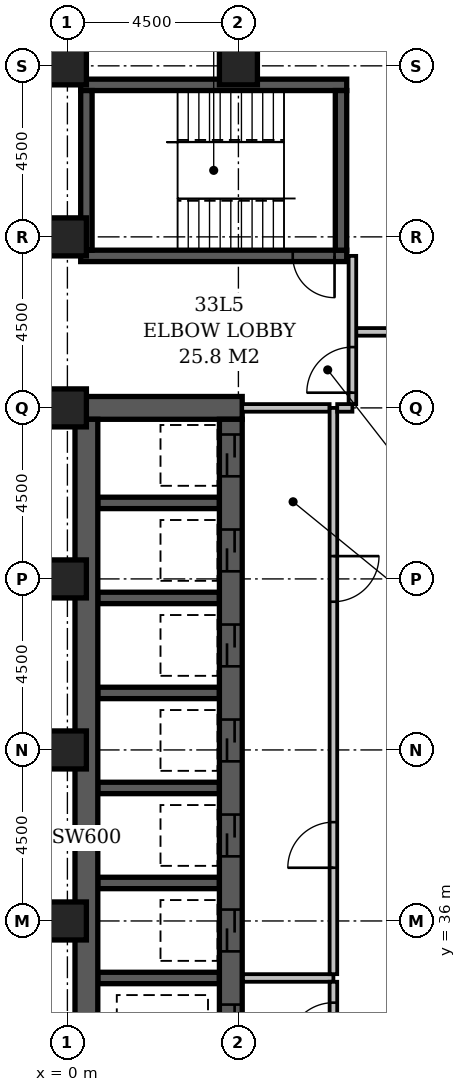
"""IFC4 building model, lengths in metres.
Left out: names, types, materials, properties, quantities, classifications, styles, units other than length and angle.
Written with IfcOpenShell. Run it as: python <this file> out.ifc"""

import sys

from ifc_helpers import new_model, si_unit, direction, frame, frame_2d, origin, origin_2d, place, context, subcontext, project, spatial, rectangle, extrude, element, fill, save


model = new_model("IFC4")
c1 = context("Model", 3, precision=1e-05, world=origin(), true_north=direction((0.0, 1.0)))
c2 = subcontext(c1, "Body", "Model", "MODEL_VIEW")
j1 = project(units=[si_unit("LENGTHUNIT", "METRE"), si_unit("PLANEANGLEUNIT", "RADIAN")], contexts=[c1])
p1 = place(None, origin())
s1 = spatial("IfcSite", under=j1, at=p1, CompositionType="ELEMENT")
p2 = place(p1, origin())
s2 = spatial("IfcBuilding", under=s1, at=p2, CompositionType="ELEMENT")
p3 = place(p2, frame((0.0, 0.0, 134.0)))
s3 = spatial("IfcBuildingStorey", under=s2, at=p3, CompositionType="ELEMENT", Elevation=134.0)
p4 = place(p3, frame((0.2, 49.5, -0.3), z_axis=(0.0, 0.0, 1.0), x_axis=(1.0, 0.0, 0.0)))
e1 = element("IfcWall", 1, at=p4, inside=s3, PredefinedType="SHEAR", context=c2, shape_type="SweptSolid", body=[
    extrude(rectangle(XDim=4.4, YDim=0.6, at=frame_2d((2.2, 0.0))), origin(), (0.0, 0.0, 1.0), 3.6),
])
p5 = place(p3, frame((0.35, 53.5, -0.3), z_axis=(0.0, 0.0, 1.0), x_axis=(1.0, 0.0, 0.0)))
e2 = element("IfcWall", 2, at=p5, inside=s3, PredefinedType="SHEAR", context=c2, shape_type="SweptSolid", body=[
    extrude(rectangle(XDim=7.0, YDim=0.3, at=frame_2d((3.5, 0.0))), origin(), (0.0, 0.0, 1.0), 3.6),
])
p6 = place(p5, frame((5.58, 0.0, 0.3)))
e3 = element("IfcOpeningElement", 3, at=p6, cuts=e2, PredefinedType="OPENING", context=c2, shape_type="SweptSolid", body=[
    extrude(rectangle(XDim=1.1, YDim=2.1, at=frame_2d((0.55, 1.05))), frame((0.0, 0.162, 0.0), z_axis=(0.0, -1.0, 0.0), x_axis=(1.0, 0.0, 0.0)), (0.0, 0.0, 1.0), 0.324),
])
p7 = place(p3, frame((0.35, 58.0, -0.3), z_axis=(0.0, 0.0, 1.0), x_axis=(1.0, 0.0, 0.0)))
e4 = element("IfcWall", 4, at=p7, inside=s3, PredefinedType="SHEAR", context=c2, shape_type="SweptSolid", body=[
    extrude(rectangle(XDim=7.0, YDim=0.3, at=frame_2d((3.5, 0.0))), origin(), (0.0, 0.0, 1.0), 3.6),
])
p8 = place(p3, frame((0.5, 27.15, -0.3), z_axis=(0.0, 0.0, 1.0), x_axis=(0.0, 1.0, 0.0)))
e5 = element("IfcWall", 5, at=p8, inside=s3, PredefinedType="SHEAR", context=c2, shape_type="SweptSolid", body=[
    extrude(rectangle(XDim=22.05, YDim=0.6, at=frame_2d((11.025, 0.0))), origin(), (0.0, 0.0, 1.0), 3.6),
])
p9 = place(p3, frame((0.5, 53.65, -0.3), z_axis=(0.0, 0.0, 1.0), x_axis=(0.0, 1.0, 0.0)))
e6 = element("IfcWall", 6, at=p9, inside=s3, PredefinedType="SHEAR", context=c2, shape_type="SweptSolid", body=[
    extrude(rectangle(XDim=4.2, YDim=0.3, at=frame_2d((2.1, 0.0))), origin(), (0.0, 0.0, 1.0), 3.6),
])
for number, where, z_axis, x_axis in (
    (7, (0.8, 34.5, -0.3), (0.0, 0.0, 1.0), (1.0, 0.0, 0.0)),
    (8, (0.8, 37.0, -0.3), (0.0, 0.0, 1.0), (1.0, 0.0, 0.0)),
    (9, (0.8, 39.5, -0.3), (0.0, 0.0, 1.0), (1.0, 0.0, 0.0)),
    (10, (0.8, 42.0, -0.3), (0.0, 0.0, 1.0), (1.0, 0.0, 0.0)),
    (11, (0.8, 44.5, -0.3), (0.0, 0.0, 1.0), (1.0, 0.0, 0.0)),
    (12, (0.8, 47.0, -0.3), (0.0, 0.0, 1.0), (1.0, 0.0, 0.0)),
):
    element("IfcWall", number, at=place(p3, frame(where, z_axis=z_axis, x_axis=x_axis)), inside=s3, PredefinedType="SHEAR", context=c2, shape_type="SweptSolid", body=[
        extrude(rectangle(XDim=3.2, YDim=0.3, at=frame_2d((1.6, 0.0))), origin(), (0.0, 0.0, 1.0), 3.6),
    ])
p10 = place(p3, frame((4.3, 27.15, -0.3), z_axis=(0.0, 0.0, 1.0), x_axis=(0.0, 1.0, 0.0)))
e13 = element("IfcWall", 13, at=p10, inside=s3, PredefinedType="SHEAR", context=c2, shape_type="SweptSolid", body=[
    extrude(rectangle(XDim=22.05, YDim=0.6, at=frame_2d((11.025, 0.0))), origin(), (0.0, 0.0, 1.0), 3.6),
])
p11 = place(p10, frame((3.05, 0.0, 0.3)))
e14 = element("IfcOpeningElement", 14, at=p11, cuts=e13, PredefinedType="OPENING", context=c2, shape_type="SweptSolid", body=[
    extrude(rectangle(XDim=1.1, YDim=2.1, at=frame_2d((0.55, 1.05))), frame((0.0, 0.312, 0.0), z_axis=(0.0, -1.0, 0.0), x_axis=(1.0, 0.0, 0.0)), (0.0, 0.0, 1.0), 0.624),
])
p12 = place(p10, frame((0.55, 0.0, 0.3)))
e15 = element("IfcOpeningElement", 15, at=p12, cuts=e13, PredefinedType="OPENING", context=c2, shape_type="SweptSolid", body=[
    extrude(rectangle(XDim=1.1, YDim=2.1, at=frame_2d((0.55, 1.05))), frame((0.0, 0.312, 0.0), z_axis=(0.0, -1.0, 0.0), x_axis=(1.0, 0.0, 0.0)), (0.0, 0.0, 1.0), 0.624),
])
p13 = place(p10, frame((20.55, 0.0, 0.3)))
e16 = element("IfcOpeningElement", 16, at=p13, cuts=e13, PredefinedType="OPENING", context=c2, shape_type="SweptSolid", body=[
    extrude(rectangle(XDim=1.1, YDim=2.1, at=frame_2d((0.55, 1.05))), frame((0.0, 0.312, 0.0), z_axis=(0.0, -1.0, 0.0), x_axis=(1.0, 0.0, 0.0)), (0.0, 0.0, 1.0), 0.624),
])
p14 = place(p10, frame((18.05, 0.0, 0.3)))
e17 = element("IfcOpeningElement", 17, at=p14, cuts=e13, PredefinedType="OPENING", context=c2, shape_type="SweptSolid", body=[
    extrude(rectangle(XDim=1.1, YDim=2.1, at=frame_2d((0.55, 1.05))), frame((0.0, 0.312, 0.0), z_axis=(0.0, -1.0, 0.0), x_axis=(1.0, 0.0, 0.0)), (0.0, 0.0, 1.0), 0.624),
])
p15 = place(p10, frame((15.55, 0.0, 0.3)))
e18 = element("IfcOpeningElement", 18, at=p15, cuts=e13, PredefinedType="OPENING", context=c2, shape_type="SweptSolid", body=[
    extrude(rectangle(XDim=1.1, YDim=2.1, at=frame_2d((0.55, 1.05))), frame((0.0, 0.312, 0.0), z_axis=(0.0, -1.0, 0.0), x_axis=(1.0, 0.0, 0.0)), (0.0, 0.0, 1.0), 0.624),
])
p16 = place(p10, frame((13.05, 0.0, 0.3)))
e19 = element("IfcOpeningElement", 19, at=p16, cuts=e13, PredefinedType="OPENING", context=c2, shape_type="SweptSolid", body=[
    extrude(rectangle(XDim=1.1, YDim=2.1, at=frame_2d((0.55, 1.05))), frame((0.0, 0.312, 0.0), z_axis=(0.0, -1.0, 0.0), x_axis=(1.0, 0.0, 0.0)), (0.0, 0.0, 1.0), 0.624),
])
p17 = place(p10, frame((10.55, 0.0, 0.3)))
e20 = element("IfcOpeningElement", 20, at=p17, cuts=e13, PredefinedType="OPENING", context=c2, shape_type="SweptSolid", body=[
    extrude(rectangle(XDim=1.1, YDim=2.1, at=frame_2d((0.55, 1.05))), frame((0.0, 0.312, 0.0), z_axis=(0.0, -1.0, 0.0), x_axis=(1.0, 0.0, 0.0)), (0.0, 0.0, 1.0), 0.624),
])
p18 = place(p10, frame((8.05, 0.0, 0.3)))
e21 = element("IfcOpeningElement", 21, at=p18, cuts=e13, PredefinedType="OPENING", context=c2, shape_type="SweptSolid", body=[
    extrude(rectangle(XDim=1.1, YDim=2.1, at=frame_2d((0.55, 1.05))), frame((0.0, 0.312, 0.0), z_axis=(0.0, -1.0, 0.0), x_axis=(1.0, 0.0, 0.0)), (0.0, 0.0, 1.0), 0.624),
])
p19 = place(p10, frame((5.55, 0.0, 0.3)))
e22 = element("IfcOpeningElement", 22, at=p19, cuts=e13, PredefinedType="OPENING", context=c2, shape_type="SweptSolid", body=[
    extrude(rectangle(XDim=1.1, YDim=2.1, at=frame_2d((0.55, 1.05))), frame((0.0, 0.312, 0.0), z_axis=(0.0, -1.0, 0.0), x_axis=(1.0, 0.0, 0.0)), (0.0, 0.0, 1.0), 0.624),
])
p20 = place(p3, frame((7.2, 53.65, -0.3), z_axis=(0.0, 0.0, 1.0), x_axis=(0.0, 1.0, 0.0)))
e23 = element("IfcWall", 23, at=p20, inside=s3, PredefinedType="SHEAR", context=c2, shape_type="SweptSolid", body=[
    extrude(rectangle(XDim=4.2, YDim=0.3, at=frame_2d((2.1, 0.0))), origin(), (0.0, 0.0, 1.0), 3.6),
])
for number, where, z_axis, x_axis in (
    (24, (0.0, 36.0, -0.3), (0.0, 0.0, 1.0), (1.0, 0.0, 0.0)),
    (25, (0.0, 40.5, -0.3), (0.0, 0.0, 1.0), (1.0, 0.0, 0.0)),
    (26, (0.0, 45.0, -0.3), (0.0, 0.0, 1.0), (1.0, 0.0, 0.0)),
    (27, (0.0, 49.5, -0.3), (0.0, 0.0, 1.0), (1.0, 0.0, 0.0)),
    (28, (0.0, 54.0, -0.3), (0.0, 0.0, 1.0), (1.0, 0.0, 0.0)),
    (29, (0.0, 58.5, -0.3), (0.0, 0.0, 1.0), (1.0, 0.0, 0.0)),
    (30, (4.5, 58.5, -0.3), (0.0, 0.0, 1.0), (1.0, 0.0, 0.0)),
):
    element("IfcColumn", number, at=place(p3, frame(where, z_axis=z_axis, x_axis=x_axis)), inside=s3, PredefinedType="COLUMN", context=c2, shape_type="SweptSolid", body=[
        extrude(rectangle(XDim=1.0, YDim=1.0, at=origin_2d()), origin(), (0.0, 0.0, 1.0), 3.6),
    ])
p21 = place(p3, frame((4.62, 34.5, 0.0), z_axis=(0.0, 0.0, 1.0), x_axis=(1.0, 0.0, 0.0)))
e31 = element("IfcWall", 31, at=p21, inside=s3, PredefinedType="PARTITIONING", context=c2, shape_type="SweptSolid", body=[
    extrude(rectangle(XDim=2.38, YDim=0.2, at=frame_2d((1.19, 0.0))), origin(), (0.0, 0.0, 1.0), 3.3),
])
p22 = place(p3, frame((7.0, 34.6, 0.0), z_axis=(0.0, 0.0, 1.0), x_axis=(0.0, 1.0, 0.0)))
e32 = element("IfcWall", 32, at=p22, inside=s3, PredefinedType="PARTITIONING", context=c2, shape_type="SweptSolid", body=[
    extrude(rectangle(XDim=14.9, YDim=0.2, at=frame_2d((7.45, 0.0))), origin(), (0.0, 0.0, 1.0), 3.3),
])
p23 = place(p22, frame((2.8, 0.0, 0.0)))
e33 = element("IfcOpeningElement", 33, at=p23, cuts=e32, PredefinedType="OPENING", context=c2, shape_type="SweptSolid", body=[
    extrude(rectangle(XDim=1.2, YDim=2.1, at=frame_2d((0.6, 1.05))), frame((0.0, 0.112, 0.0), z_axis=(0.0, -1.0, 0.0), x_axis=(1.0, 0.0, 0.0)), (0.0, 0.0, 1.0), 0.224),
])
p24 = place(p22, frame((9.8, 0.0, 0.0)))
e34 = element("IfcOpeningElement", 34, at=p24, cuts=e32, PredefinedType="OPENING", context=c2, shape_type="SweptSolid", body=[
    extrude(rectangle(XDim=1.2, YDim=2.1, at=frame_2d((0.6, 1.05))), frame((0.0, 0.112, 0.0), z_axis=(0.0, -1.0, 0.0), x_axis=(1.0, 0.0, 0.0)), (0.0, 0.0, 1.0), 0.224),
])
p25 = place(p3, frame((4.6, 49.5, 0.0), z_axis=(0.0, 0.0, 1.0), x_axis=(1.0, 0.0, 0.0)))
e35 = element("IfcWall", 35, at=p25, inside=s3, PredefinedType="PARTITIONING", context=c2, shape_type="SweptSolid", body=[
    extrude(rectangle(XDim=2.3, YDim=0.2, at=frame_2d((1.15, 0.0))), origin(), (0.0, 0.0, 1.0), 3.3),
])
p26 = place(p3, frame((7.0, 32.1, 0.0), z_axis=(0.0, 0.0, 1.0), x_axis=(0.0, 1.0, 0.0)))
e36 = element("IfcWall", 36, at=p26, inside=s3, PredefinedType="PARTITIONING", context=c2, shape_type="SweptSolid", body=[
    extrude(rectangle(XDim=2.3, YDim=0.2, at=frame_2d((1.15, 0.0))), origin(), (0.0, 0.0, 1.0), 3.3),
])
p27 = place(p26, frame((0.55, 0.0, 0.0)))
e37 = element("IfcOpeningElement", 37, at=p27, cuts=e36, PredefinedType="OPENING", context=c2, shape_type="SweptSolid", body=[
    extrude(rectangle(XDim=1.2, YDim=2.1, at=frame_2d((0.6, 1.05))), frame((0.0, 0.112, 0.0), z_axis=(0.0, -1.0, 0.0), x_axis=(1.0, 0.0, 0.0)), (0.0, 0.0, 1.0), 0.224),
])
p28 = place(p3, frame((7.1, 49.5, 0.0), z_axis=(0.0, 0.0, 1.0), x_axis=(1.0, 0.0, 0.0)))
e38 = element("IfcWall", 38, at=p28, inside=s3, PredefinedType="PARTITIONING", context=c2, shape_type="SweptSolid", body=[
    extrude(rectangle(XDim=0.4, YDim=0.2, at=frame_2d((0.2, 0.0))), origin(), (0.0, 0.0, 1.0), 3.3),
])
p29 = place(p3, frame((7.5, 49.6, 0.0), z_axis=(0.0, 0.0, 1.0), x_axis=(0.0, 1.0, 0.0)))
e39 = element("IfcWall", 39, at=p29, inside=s3, PredefinedType="PARTITIONING", context=c2, shape_type="SweptSolid", body=[
    extrude(rectangle(XDim=3.9, YDim=0.2, at=frame_2d((1.95, 0.0))), origin(), (0.0, 0.0, 1.0), 3.3),
])
p30 = place(p29, frame((0.3, 0.0, 0.0)))
e40 = element("IfcOpeningElement", 40, at=p30, cuts=e39, PredefinedType="OPENING", context=c2, shape_type="SweptSolid", body=[
    extrude(rectangle(XDim=1.2, YDim=2.1, at=frame_2d((0.6, 1.05))), frame((0.0, 0.112, 0.0), z_axis=(0.0, -1.0, 0.0), x_axis=(1.0, 0.0, 0.0)), (0.0, 0.0, 1.0), 0.224),
])
p31 = place(p3, frame((7.6, 51.5, 0.0), z_axis=(0.0, 0.0, 1.0), x_axis=(1.0, 0.0, 0.0)))
e41 = element("IfcWall", 41, at=p31, inside=s3, PredefinedType="PARTITIONING", context=c2, shape_type="SweptSolid", body=[
    extrude(rectangle(XDim=15.3, YDim=0.2, at=frame_2d((7.65, 0.0))), origin(), (0.0, 0.0, 1.0), 3.3),
])
p32 = place(p31, frame((3.55, 0.0, 0.0)))
e42 = element("IfcOpeningElement", 42, at=p32, cuts=e41, PredefinedType="OPENING", context=c2, shape_type="SweptSolid", body=[
    extrude(rectangle(XDim=0.9, YDim=2.1, at=frame_2d((0.45, 1.05))), frame((0.0, 0.112, 0.0), z_axis=(0.0, -1.0, 0.0), x_axis=(1.0, 0.0, 0.0)), (0.0, 0.0, 1.0), 0.224),
])
p33 = place(p31, frame((11.3, 0.0, 0.0)))
e43 = element("IfcOpeningElement", 43, at=p33, cuts=e41, PredefinedType="OPENING", context=c2, shape_type="SweptSolid", body=[
    extrude(rectangle(XDim=0.9, YDim=2.1, at=frame_2d((0.45, 1.05))), frame((0.0, 0.112, 0.0), z_axis=(0.0, -1.0, 0.0), x_axis=(1.0, 0.0, 0.0)), (0.0, 0.0, 1.0), 0.224),
])
p34 = place(p30, origin())
e44 = element("IfcDoor", 44, at=p34, inside=s3, OperationType="SINGLE_SWING_LEFT", PredefinedType="DOOR", context=c2, shape_type="SweptSolid", body=[
    extrude(rectangle(XDim=1.2, YDim=2.1, at=frame_2d((0.6, 1.05))), frame((0.0, 0.025, 0.0), z_axis=(0.0, -1.0, 0.0), x_axis=(1.0, 0.0, 0.0)), (0.0, 0.0, 1.0), 0.05),
])
fill(e40, e44)
p35 = place(p13, origin())
e45 = element("IfcDoor", 45, at=p35, inside=s3, OperationType="SLIDING_TO_LEFT", PredefinedType="DOOR", context=c2, shape_type="SweptSolid", body=[
    extrude(rectangle(XDim=1.1, YDim=2.1, at=frame_2d((0.55, 1.05))), frame((0.0, 0.025, 0.0), z_axis=(0.0, -1.0, 0.0), x_axis=(1.0, 0.0, 0.0)), (0.0, 0.0, 1.0), 0.05),
])
fill(e16, e45)
p36 = place(p14, origin())
e46 = element("IfcDoor", 46, at=p36, inside=s3, OperationType="SLIDING_TO_LEFT", PredefinedType="DOOR", context=c2, shape_type="SweptSolid", body=[
    extrude(rectangle(XDim=1.1, YDim=2.1, at=frame_2d((0.55, 1.05))), frame((0.0, 0.025, 0.0), z_axis=(0.0, -1.0, 0.0), x_axis=(1.0, 0.0, 0.0)), (0.0, 0.0, 1.0), 0.05),
])
fill(e17, e46)
p37 = place(p15, origin())
e47 = element("IfcDoor", 47, at=p37, inside=s3, OperationType="SLIDING_TO_LEFT", PredefinedType="DOOR", context=c2, shape_type="SweptSolid", body=[
    extrude(rectangle(XDim=1.1, YDim=2.1, at=frame_2d((0.55, 1.05))), frame((0.0, 0.025, 0.0), z_axis=(0.0, -1.0, 0.0), x_axis=(1.0, 0.0, 0.0)), (0.0, 0.0, 1.0), 0.05),
])
fill(e18, e47)
p38 = place(p16, origin())
e48 = element("IfcDoor", 48, at=p38, inside=s3, OperationType="SLIDING_TO_LEFT", PredefinedType="DOOR", context=c2, shape_type="SweptSolid", body=[
    extrude(rectangle(XDim=1.1, YDim=2.1, at=frame_2d((0.55, 1.05))), frame((0.0, 0.025, 0.0), z_axis=(0.0, -1.0, 0.0), x_axis=(1.0, 0.0, 0.0)), (0.0, 0.0, 1.0), 0.05),
])
fill(e19, e48)
p39 = place(p17, origin())
e49 = element("IfcDoor", 49, at=p39, inside=s3, OperationType="SLIDING_TO_LEFT", PredefinedType="DOOR", context=c2, shape_type="SweptSolid", body=[
    extrude(rectangle(XDim=1.1, YDim=2.1, at=frame_2d((0.55, 1.05))), frame((0.0, 0.025, 0.0), z_axis=(0.0, -1.0, 0.0), x_axis=(1.0, 0.0, 0.0)), (0.0, 0.0, 1.0), 0.05),
])
fill(e20, e49)
p40 = place(p18, origin())
e50 = element("IfcDoor", 50, at=p40, inside=s3, OperationType="SLIDING_TO_LEFT", PredefinedType="DOOR", context=c2, shape_type="SweptSolid", body=[
    extrude(rectangle(XDim=1.1, YDim=2.1, at=frame_2d((0.55, 1.05))), frame((0.0, 0.025, 0.0), z_axis=(0.0, -1.0, 0.0), x_axis=(1.0, 0.0, 0.0)), (0.0, 0.0, 1.0), 0.05),
])
fill(e21, e50)
p41 = place(p23, origin())
e51 = element("IfcDoor", 51, at=p41, inside=s3, OperationType="SINGLE_SWING_LEFT", PredefinedType="DOOR", context=c2, shape_type="SweptSolid", body=[
    extrude(rectangle(XDim=1.2, YDim=2.1, at=frame_2d((0.6, 1.05))), frame((0.0, 0.025, 0.0), z_axis=(0.0, -1.0, 0.0), x_axis=(1.0, 0.0, 0.0)), (0.0, 0.0, 1.0), 0.05),
])
fill(e33, e51)
p42 = place(p24, origin())
e52 = element("IfcDoor", 52, at=p42, inside=s3, OperationType="SINGLE_SWING_RIGHT", PredefinedType="DOOR", context=c2, shape_type="SweptSolid", body=[
    extrude(rectangle(XDim=1.2, YDim=2.1, at=frame_2d((0.6, 1.05))), frame((0.0, 0.025, 0.0), z_axis=(0.0, -1.0, 0.0), x_axis=(1.0, 0.0, 0.0)), (0.0, 0.0, 1.0), 0.05),
])
fill(e34, e52)
p43 = place(p27, origin())
e53 = element("IfcDoor", 53, at=p43, inside=s3, OperationType="SINGLE_SWING_LEFT", PredefinedType="DOOR", context=c2, shape_type="SweptSolid", body=[
    extrude(rectangle(XDim=1.2, YDim=2.1, at=frame_2d((0.6, 1.05))), frame((0.0, 0.025, 0.0), z_axis=(0.0, -1.0, 0.0), x_axis=(1.0, 0.0, 0.0)), (0.0, 0.0, 1.0), 0.05),
])
fill(e37, e53)
p44 = place(p19, origin())
e54 = element("IfcDoor", 54, at=p44, inside=s3, OperationType="SLIDING_TO_LEFT", PredefinedType="DOOR", context=c2, shape_type="SweptSolid", body=[
    extrude(rectangle(XDim=1.1, YDim=2.1, at=frame_2d((0.55, 1.05))), frame((0.0, 0.025, 0.0), z_axis=(0.0, -1.0, 0.0), x_axis=(1.0, 0.0, 0.0)), (0.0, 0.0, 1.0), 0.05),
])
fill(e22, e54)
p45 = place(p6, origin())
e55 = element("IfcDoor", 55, at=p45, inside=s3, OperationType="SINGLE_SWING_RIGHT", PredefinedType="DOOR", context=c2, shape_type="SweptSolid", body=[
    extrude(rectangle(XDim=1.1, YDim=2.1, at=frame_2d((0.55, 1.05))), frame((0.0, 0.025, 0.0), z_axis=(0.0, -1.0, 0.0), x_axis=(1.0, 0.0, 0.0)), (0.0, 0.0, 1.0), 0.05),
])
fill(e3, e55)
save(model, sys.argv[1])
